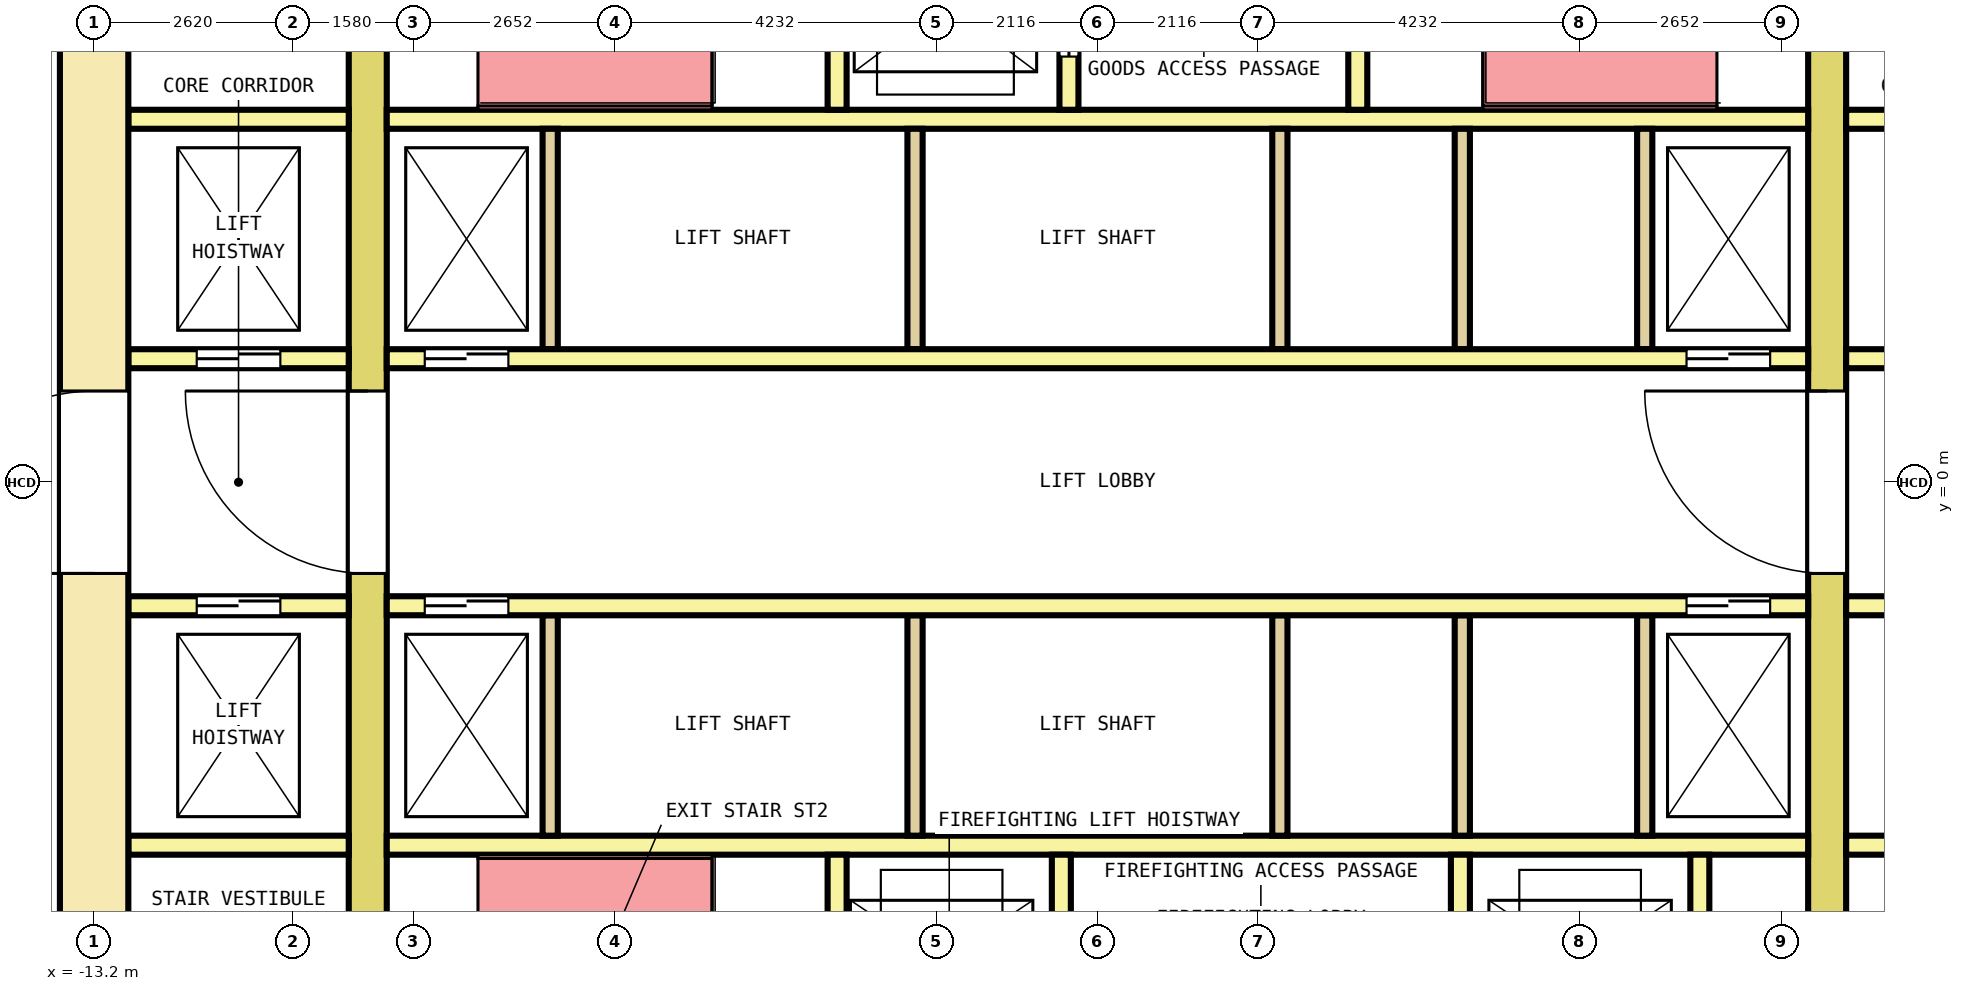
"""IFC4 building model, lengths in metres.
Left out: names, types, materials, properties, quantities, classifications, styles, units other than length and angle.
Written with IfcOpenShell. Run it as: python <this file> out.ifc"""

import sys

from ifc_helpers import new_model, si_unit, direction, frame, frame_2d, origin, place, context, subcontext, project, spatial, rectangle, extrude, element, fill, save


model = new_model("IFC4")
c1 = context("Model", 3, precision=1e-05, world=origin(), true_north=direction((0.0, 1.0)))
c2 = subcontext(c1, "Body", "Model", "MODEL_VIEW")
j1 = project(units=[si_unit("LENGTHUNIT", "METRE"), si_unit("PLANEANGLEUNIT", "RADIAN")], contexts=[c1])
p1 = place(None, origin())
s1 = spatial("IfcSite", under=j1, at=p1, CompositionType="ELEMENT")
p2 = place(p1, origin())
s2 = spatial("IfcBuilding", under=s1, at=p2, CompositionType="ELEMENT")
p3 = place(p2, frame((0.0, 0.0, 27.8)))
s3 = spatial("IfcBuildingStorey", under=s2, at=p3, CompositionType="ELEMENT", Elevation=27.8)
p4 = place(p3, frame((-13.2, -10.35, 0.0), z_axis=(0.0, 0.0, 1.0), x_axis=(0.0, 1.0, 0.0)))
e1 = element("IfcWall", 1, at=p4, inside=s3, PredefinedType="SHEAR", context=c2, shape_type="SweptSolid", body=[
    extrude(rectangle(XDim=20.7, YDim=0.9, at=frame_2d((10.35, 0.0))), origin(), (0.0, 0.0, 1.0), 4.1),
])
p5 = place(p4, frame((9.15, 0.0, 0.0)))
e2 = element("IfcOpeningElement", 2, at=p5, cuts=e1, PredefinedType="OPENING", context=c2, shape_type="SweptSolid", body=[
    extrude(rectangle(XDim=2.4, YDim=2.1, at=frame_2d((1.2, 1.05))), frame((0.0, 0.46, 0.0), z_axis=(0.0, -1.0, 0.0), x_axis=(1.0, 0.0, 0.0)), (0.0, 0.0, 1.0), 0.92),
])
p6 = place(p4, frame((16.05, 0.0, 0.0)))
e3 = element("IfcOpeningElement", 3, at=p6, cuts=e1, PredefinedType="OPENING", context=c2, shape_type="SweptSolid", body=[
    extrude(rectangle(XDim=1.2, YDim=2.1, at=frame_2d((0.6, 1.05))), frame((0.0, 0.46, 0.0), z_axis=(0.0, -1.0, 0.0), x_axis=(1.0, 0.0, 0.0)), (0.0, 0.0, 1.0), 0.92),
])
p7 = place(p4, frame((3.45, 0.0, 0.0)))
e4 = element("IfcOpeningElement", 4, at=p7, cuts=e1, PredefinedType="OPENING", context=c2, shape_type="SweptSolid", body=[
    extrude(rectangle(XDim=1.2, YDim=2.1, at=frame_2d((0.6, 1.05))), frame((0.0, 0.46, 0.0), z_axis=(0.0, -1.0, 0.0), x_axis=(1.0, 0.0, 0.0)), (0.0, 0.0, 1.0), 0.92),
])
p8 = place(p3, frame((-9.6, -7.7, 0.0), z_axis=(0.0, 0.0, 1.0), x_axis=(0.0, 1.0, 0.0)))
e5 = element("IfcWall", 5, at=p8, inside=s3, PredefinedType="SHEAR", context=c2, shape_type="SweptSolid", body=[
    extrude(rectangle(XDim=15.4, YDim=0.5, at=frame_2d((7.7, 0.0))), origin(), (0.0, 0.0, 1.0), 4.1),
])
p9 = place(p8, frame((6.5, 0.0, 0.0)))
e6 = element("IfcOpeningElement", 6, at=p9, cuts=e5, PredefinedType="OPENING", context=c2, shape_type="SweptSolid", body=[
    extrude(rectangle(XDim=2.4, YDim=2.1, at=frame_2d((1.2, 1.05))), frame((0.0, 0.26, 0.0), z_axis=(0.0, -1.0, 0.0), x_axis=(1.0, 0.0, 0.0)), (0.0, 0.0, 1.0), 0.52),
])
p10 = place(p8, frame((13.4, 0.0, 0.0)))
e7 = element("IfcOpeningElement", 7, at=p10, cuts=e5, PredefinedType="OPENING", context=c2, shape_type="SweptSolid", body=[
    extrude(rectangle(XDim=1.2, YDim=2.1, at=frame_2d((0.6, 1.05))), frame((0.0, 0.26, 0.0), z_axis=(0.0, -1.0, 0.0), x_axis=(1.0, 0.0, 0.0)), (0.0, 0.0, 1.0), 0.52),
])
p11 = place(p8, frame((0.8, 0.0, 0.0)))
e8 = element("IfcOpeningElement", 8, at=p11, cuts=e5, PredefinedType="OPENING", context=c2, shape_type="SweptSolid", body=[
    extrude(rectangle(XDim=1.2, YDim=2.1, at=frame_2d((0.6, 1.05))), frame((0.0, 0.26, 0.0), z_axis=(0.0, -1.0, 0.0), x_axis=(1.0, 0.0, 0.0)), (0.0, 0.0, 1.0), 0.52),
])
p12 = place(p3, frame((9.6, -7.7, 0.0), z_axis=(0.0, 0.0, 1.0), x_axis=(0.0, 1.0, 0.0)))
e9 = element("IfcWall", 9, at=p12, inside=s3, PredefinedType="SHEAR", context=c2, shape_type="SweptSolid", body=[
    extrude(rectangle(XDim=15.4, YDim=0.5, at=frame_2d((7.7, 0.0))), origin(), (0.0, 0.0, 1.0), 4.1),
])
p13 = place(p12, frame((6.5, 0.0, 0.0)))
e10 = element("IfcOpeningElement", 10, at=p13, cuts=e9, PredefinedType="OPENING", context=c2, shape_type="SweptSolid", body=[
    extrude(rectangle(XDim=2.4, YDim=2.1, at=frame_2d((1.2, 1.05))), frame((0.0, 0.26, 0.0), z_axis=(0.0, -1.0, 0.0), x_axis=(1.0, 0.0, 0.0)), (0.0, 0.0, 1.0), 0.52),
])
p14 = place(p12, frame((13.4, 0.0, 0.0)))
e11 = element("IfcOpeningElement", 11, at=p14, cuts=e9, PredefinedType="OPENING", context=c2, shape_type="SweptSolid", body=[
    extrude(rectangle(XDim=1.2, YDim=2.1, at=frame_2d((0.6, 1.05))), frame((0.0, 0.26, 0.0), z_axis=(0.0, -1.0, 0.0), x_axis=(1.0, 0.0, 0.0)), (0.0, 0.0, 1.0), 0.52),
])
p15 = place(p12, frame((0.9, 0.0, 0.0)))
e12 = element("IfcOpeningElement", 12, at=p15, cuts=e9, PredefinedType="OPENING", context=c2, shape_type="SweptSolid", body=[
    extrude(rectangle(XDim=1.0, YDim=2.1, at=frame_2d((0.5, 1.05))), frame((0.0, 0.26, 0.0), z_axis=(0.0, -1.0, 0.0), x_axis=(1.0, 0.0, 0.0)), (0.0, 0.0, 1.0), 0.52),
])
p16 = place(p3, frame((-12.75, 1.625, 0.0), z_axis=(0.0, 0.0, 1.0), x_axis=(1.0, 0.0, 0.0)))
e13 = element("IfcWall", 13, at=p16, inside=s3, PredefinedType="SOLIDWALL", context=c2, shape_type="SweptSolid", body=[
    extrude(rectangle(XDim=2.9, YDim=0.25, at=frame_2d((1.45, 0.0))), origin(), (0.0, 0.0, 1.0), 4.1),
])
p17 = place(p16, frame((0.9, 0.0, 0.0)))
e14 = element("IfcOpeningElement", 14, at=p17, cuts=e13, PredefinedType="OPENING", context=c2, shape_type="SweptSolid", body=[
    extrude(rectangle(XDim=1.1, YDim=2.1, at=frame_2d((0.55, 1.05))), frame((0.0, 0.135, 0.0), z_axis=(0.0, -1.0, 0.0), x_axis=(1.0, 0.0, 0.0)), (0.0, 0.0, 1.0), 0.27),
])
p18 = place(p3, frame((-9.35, 1.625, 0.0), z_axis=(0.0, 0.0, 1.0), x_axis=(1.0, 0.0, 0.0)))
e15 = element("IfcWall", 15, at=p18, inside=s3, PredefinedType="SOLIDWALL", context=c2, shape_type="SweptSolid", body=[
    extrude(rectangle(XDim=18.7, YDim=0.25, at=frame_2d((9.35, 0.0))), origin(), (0.0, 0.0, 1.0), 4.1),
])
p19 = place(p18, frame((0.5, 0.0, 0.0)))
e16 = element("IfcOpeningElement", 16, at=p19, cuts=e15, PredefinedType="OPENING", context=c2, shape_type="SweptSolid", body=[
    extrude(rectangle(XDim=1.1, YDim=2.1, at=frame_2d((0.55, 1.05))), frame((0.0, 0.135, 0.0), z_axis=(0.0, -1.0, 0.0), x_axis=(1.0, 0.0, 0.0)), (0.0, 0.0, 1.0), 0.27),
])
p20 = place(p18, frame((17.1, 0.0, 0.0)))
e17 = element("IfcOpeningElement", 17, at=p20, cuts=e15, PredefinedType="OPENING", context=c2, shape_type="SweptSolid", body=[
    extrude(rectangle(XDim=1.1, YDim=2.1, at=frame_2d((0.55, 1.05))), frame((0.0, 0.135, 0.0), z_axis=(0.0, -1.0, 0.0), x_axis=(1.0, 0.0, 0.0)), (0.0, 0.0, 1.0), 0.27),
])
p21 = place(p3, frame((9.85, 1.625, 0.0), z_axis=(0.0, 0.0, 1.0), x_axis=(1.0, 0.0, 0.0)))
e18 = element("IfcWall", 18, at=p21, inside=s3, PredefinedType="SOLIDWALL", context=c2, shape_type="SweptSolid", body=[
    extrude(rectangle(XDim=2.9, YDim=0.25, at=frame_2d((1.45, 0.0))), origin(), (0.0, 0.0, 1.0), 4.1),
])
p22 = place(p21, frame((0.9, 0.0, 0.0)))
e19 = element("IfcOpeningElement", 19, at=p22, cuts=e18, PredefinedType="OPENING", context=c2, shape_type="SweptSolid", body=[
    extrude(rectangle(XDim=1.1, YDim=2.1, at=frame_2d((0.55, 1.05))), frame((0.0, 0.135, 0.0), z_axis=(0.0, -1.0, 0.0), x_axis=(1.0, 0.0, 0.0)), (0.0, 0.0, 1.0), 0.27),
])
p23 = place(p3, frame((-12.75, 4.775, 0.0), z_axis=(0.0, 0.0, 1.0), x_axis=(1.0, 0.0, 0.0)))
e20 = element("IfcWall", 20, at=p23, inside=s3, PredefinedType="SOLIDWALL", context=c2, shape_type="SweptSolid", body=[
    extrude(rectangle(XDim=2.9, YDim=0.25, at=frame_2d((1.45, 0.0))), origin(), (0.0, 0.0, 1.0), 4.1),
])
p24 = place(p3, frame((-9.35, 4.775, 0.0), z_axis=(0.0, 0.0, 1.0), x_axis=(1.0, 0.0, 0.0)))
e21 = element("IfcWall", 21, at=p24, inside=s3, PredefinedType="SOLIDWALL", context=c2, shape_type="SweptSolid", body=[
    extrude(rectangle(XDim=18.7, YDim=0.25, at=frame_2d((9.35, 0.0))), origin(), (0.0, 0.0, 1.0), 4.1),
])
p25 = place(p3, frame((9.85, 4.775, 0.0), z_axis=(0.0, 0.0, 1.0), x_axis=(1.0, 0.0, 0.0)))
e22 = element("IfcWall", 22, at=p25, inside=s3, PredefinedType="SOLIDWALL", context=c2, shape_type="SweptSolid", body=[
    extrude(rectangle(XDim=2.9, YDim=0.25, at=frame_2d((1.45, 0.0))), origin(), (0.0, 0.0, 1.0), 4.1),
])
for number, where, z_axis, x_axis in (
    (23, (-7.2, 1.75, 0.0), (0.0, 0.0, 1.0), (0.0, 1.0, 0.0)),
    (24, (-2.4, 1.75, 0.0), (0.0, 0.0, 1.0), (0.0, 1.0, 0.0)),
    (25, (2.4, 1.75, 0.0), (0.0, 0.0, 1.0), (0.0, 1.0, 0.0)),
    (26, (4.8, 1.75, 0.0), (0.0, 0.0, 1.0), (0.0, 1.0, 0.0)),
    (27, (7.2, 1.75, 0.0), (0.0, 0.0, 1.0), (0.0, 1.0, 0.0)),
):
    element("IfcWall", number, at=place(p3, frame(where, z_axis=z_axis, x_axis=x_axis)), inside=s3, PredefinedType="SOLIDWALL", context=c2, shape_type="SweptSolid", body=[
        extrude(rectangle(XDim=2.9, YDim=0.2, at=frame_2d((1.45, 0.0))), origin(), (0.0, 0.0, 1.0), 4.1),
    ])
p26 = place(p3, frame((-12.75, -1.625, 0.0), z_axis=(0.0, 0.0, 1.0), x_axis=(1.0, 0.0, 0.0)))
e28 = element("IfcWall", 28, at=p26, inside=s3, PredefinedType="SOLIDWALL", context=c2, shape_type="SweptSolid", body=[
    extrude(rectangle(XDim=2.9, YDim=0.25, at=frame_2d((1.45, 0.0))), origin(), (0.0, 0.0, 1.0), 4.1),
])
p27 = place(p26, frame((0.9, 0.0, 0.0)))
e29 = element("IfcOpeningElement", 29, at=p27, cuts=e28, PredefinedType="OPENING", context=c2, shape_type="SweptSolid", body=[
    extrude(rectangle(XDim=1.1, YDim=2.1, at=frame_2d((0.55, 1.05))), frame((0.0, 0.135, 0.0), z_axis=(0.0, -1.0, 0.0), x_axis=(1.0, 0.0, 0.0)), (0.0, 0.0, 1.0), 0.27),
])
p28 = place(p3, frame((-9.35, -1.625, 0.0), z_axis=(0.0, 0.0, 1.0), x_axis=(1.0, 0.0, 0.0)))
e30 = element("IfcWall", 30, at=p28, inside=s3, PredefinedType="SOLIDWALL", context=c2, shape_type="SweptSolid", body=[
    extrude(rectangle(XDim=18.7, YDim=0.25, at=frame_2d((9.35, 0.0))), origin(), (0.0, 0.0, 1.0), 4.1),
])
p29 = place(p28, frame((0.5, 0.0, 0.0)))
e31 = element("IfcOpeningElement", 31, at=p29, cuts=e30, PredefinedType="OPENING", context=c2, shape_type="SweptSolid", body=[
    extrude(rectangle(XDim=1.1, YDim=2.1, at=frame_2d((0.55, 1.05))), frame((0.0, 0.135, 0.0), z_axis=(0.0, -1.0, 0.0), x_axis=(1.0, 0.0, 0.0)), (0.0, 0.0, 1.0), 0.27),
])
p30 = place(p28, frame((17.1, 0.0, 0.0)))
e32 = element("IfcOpeningElement", 32, at=p30, cuts=e30, PredefinedType="OPENING", context=c2, shape_type="SweptSolid", body=[
    extrude(rectangle(XDim=1.1, YDim=2.1, at=frame_2d((0.55, 1.05))), frame((0.0, 0.135, 0.0), z_axis=(0.0, -1.0, 0.0), x_axis=(1.0, 0.0, 0.0)), (0.0, 0.0, 1.0), 0.27),
])
p31 = place(p3, frame((9.85, -1.625, 0.0), z_axis=(0.0, 0.0, 1.0), x_axis=(1.0, 0.0, 0.0)))
e33 = element("IfcWall", 33, at=p31, inside=s3, PredefinedType="SOLIDWALL", context=c2, shape_type="SweptSolid", body=[
    extrude(rectangle(XDim=2.9, YDim=0.25, at=frame_2d((1.45, 0.0))), origin(), (0.0, 0.0, 1.0), 4.1),
])
p32 = place(p31, frame((0.9, 0.0, 0.0)))
e34 = element("IfcOpeningElement", 34, at=p32, cuts=e33, PredefinedType="OPENING", context=c2, shape_type="SweptSolid", body=[
    extrude(rectangle(XDim=1.1, YDim=2.1, at=frame_2d((0.55, 1.05))), frame((0.0, 0.135, 0.0), z_axis=(0.0, -1.0, 0.0), x_axis=(1.0, 0.0, 0.0)), (0.0, 0.0, 1.0), 0.27),
])
p33 = place(p3, frame((-12.75, -4.775, 0.0), z_axis=(0.0, 0.0, 1.0), x_axis=(1.0, 0.0, 0.0)))
e35 = element("IfcWall", 35, at=p33, inside=s3, PredefinedType="SOLIDWALL", context=c2, shape_type="SweptSolid", body=[
    extrude(rectangle(XDim=2.9, YDim=0.25, at=frame_2d((1.45, 0.0))), origin(), (0.0, 0.0, 1.0), 4.1),
])
p34 = place(p3, frame((-9.35, -4.775, 0.0), z_axis=(0.0, 0.0, 1.0), x_axis=(1.0, 0.0, 0.0)))
e36 = element("IfcWall", 36, at=p34, inside=s3, PredefinedType="SOLIDWALL", context=c2, shape_type="SweptSolid", body=[
    extrude(rectangle(XDim=18.7, YDim=0.25, at=frame_2d((9.35, 0.0))), origin(), (0.0, 0.0, 1.0), 4.1),
])
p35 = place(p3, frame((9.85, -4.775, 0.0), z_axis=(0.0, 0.0, 1.0), x_axis=(1.0, 0.0, 0.0)))
e37 = element("IfcWall", 37, at=p35, inside=s3, PredefinedType="SOLIDWALL", context=c2, shape_type="SweptSolid", body=[
    extrude(rectangle(XDim=2.9, YDim=0.25, at=frame_2d((1.45, 0.0))), origin(), (0.0, 0.0, 1.0), 4.1),
])
for number, where, z_axis, x_axis in (
    (38, (-7.2, -4.65, 0.0), (0.0, 0.0, 1.0), (0.0, 1.0, 0.0)),
    (39, (-2.4, -4.65, 0.0), (0.0, 0.0, 1.0), (0.0, 1.0, 0.0)),
    (40, (2.4, -4.65, 0.0), (0.0, 0.0, 1.0), (0.0, 1.0, 0.0)),
    (41, (4.8, -4.65, 0.0), (0.0, 0.0, 1.0), (0.0, 1.0, 0.0)),
    (42, (7.2, -4.65, 0.0), (0.0, 0.0, 1.0), (0.0, 1.0, 0.0)),
):
    element("IfcWall", number, at=place(p3, frame(where, z_axis=z_axis, x_axis=x_axis)), inside=s3, PredefinedType="SOLIDWALL", context=c2, shape_type="SweptSolid", body=[
        extrude(rectangle(XDim=2.9, YDim=0.2, at=frame_2d((1.45, 0.0))), origin(), (0.0, 0.0, 1.0), 4.1),
    ])
p36 = place(p3, frame((-3.425, 4.9, 0.0), z_axis=(0.0, 0.0, 1.0), x_axis=(0.0, 1.0, 0.0)))
e43 = element("IfcWall", 43, at=p36, inside=s3, PredefinedType="SOLIDWALL", context=c2, shape_type="SweptSolid", body=[
    extrude(rectangle(XDim=2.8, YDim=0.25, at=frame_2d((1.4, 0.0))), origin(), (0.0, 0.0, 1.0), 4.1),
])
p37 = place(p3, frame((-0.375, 4.9, 0.0), z_axis=(0.0, 0.0, 1.0), x_axis=(0.0, 1.0, 0.0)))
e44 = element("IfcWall", 44, at=p37, inside=s3, PredefinedType="SOLIDWALL", context=c2, shape_type="SweptSolid", body=[
    extrude(rectangle(XDim=2.8, YDim=0.25, at=frame_2d((1.4, 0.0))), origin(), (0.0, 0.0, 1.0), 4.1),
])
p38 = place(p37, frame((0.7, 0.0, 0.0)))
e45 = element("IfcOpeningElement", 45, at=p38, cuts=e44, PredefinedType="OPENING", context=c2, shape_type="SweptSolid", body=[
    extrude(rectangle(XDim=1.4, YDim=2.1, at=frame_2d((0.7, 1.05))), frame((0.0, 0.135, 0.0), z_axis=(0.0, -1.0, 0.0), x_axis=(1.0, 0.0, 0.0)), (0.0, 0.0, 1.0), 0.27),
])
for number, where, z_axis, x_axis in (
    (46, (3.425, 4.9, 0.0), (0.0, 0.0, 1.0), (0.0, 1.0, 0.0)),
    (47, (-3.425, -7.7, 0.0), (0.0, 0.0, 1.0), (0.0, 1.0, 0.0)),
):
    element("IfcWall", number, at=place(p3, frame(where, z_axis=z_axis, x_axis=x_axis)), inside=s3, PredefinedType="SOLIDWALL", context=c2, shape_type="SweptSolid", body=[
        extrude(rectangle(XDim=2.8, YDim=0.25, at=frame_2d((1.4, 0.0))), origin(), (0.0, 0.0, 1.0), 4.1),
    ])
p39 = place(p3, frame((-0.475, -7.7, 0.0), z_axis=(0.0, 0.0, 1.0), x_axis=(0.0, 1.0, 0.0)))
e48 = element("IfcWall", 48, at=p39, inside=s3, PredefinedType="SOLIDWALL", context=c2, shape_type="SweptSolid", body=[
    extrude(rectangle(XDim=2.8, YDim=0.25, at=frame_2d((1.4, 0.0))), origin(), (0.0, 0.0, 1.0), 4.1),
])
p40 = place(p39, frame((0.85, 0.0, 0.0)))
e49 = element("IfcOpeningElement", 49, at=p40, cuts=e48, PredefinedType="OPENING", context=c2, shape_type="SweptSolid", body=[
    extrude(rectangle(XDim=1.1, YDim=2.1, at=frame_2d((0.55, 1.05))), frame((0.0, 0.135, 0.0), z_axis=(0.0, -1.0, 0.0), x_axis=(1.0, 0.0, 0.0)), (0.0, 0.0, 1.0), 0.27),
])
p41 = place(p3, frame((4.775, -7.7, 0.0), z_axis=(0.0, 0.0, 1.0), x_axis=(0.0, 1.0, 0.0)))
e50 = element("IfcWall", 50, at=p41, inside=s3, PredefinedType="SOLIDWALL", context=c2, shape_type="SweptSolid", body=[
    extrude(rectangle(XDim=2.8, YDim=0.25, at=frame_2d((1.4, 0.0))), origin(), (0.0, 0.0, 1.0), 4.1),
])
p42 = place(p41, frame((0.85, 0.0, 0.0)))
e51 = element("IfcOpeningElement", 51, at=p42, cuts=e50, PredefinedType="OPENING", context=c2, shape_type="SweptSolid", body=[
    extrude(rectangle(XDim=1.1, YDim=2.1, at=frame_2d((0.55, 1.05))), frame((0.0, 0.135, 0.0), z_axis=(0.0, -1.0, 0.0), x_axis=(1.0, 0.0, 0.0)), (0.0, 0.0, 1.0), 0.27),
])
p43 = place(p3, frame((7.925, -7.7, 0.0), z_axis=(0.0, 0.0, 1.0), x_axis=(0.0, 1.0, 0.0)))
e52 = element("IfcWall", 52, at=p43, inside=s3, PredefinedType="SOLIDWALL", context=c2, shape_type="SweptSolid", body=[
    extrude(rectangle(XDim=2.8, YDim=0.25, at=frame_2d((1.4, 0.0))), origin(), (0.0, 0.0, 1.0), 4.1),
])
p44 = place(p17, origin())
e53 = element("IfcDoor", 53, at=p44, inside=s3, OperationType="DOUBLE_DOOR_SLIDING", PredefinedType="DOOR", context=c2, shape_type="SweptSolid", body=[
    extrude(rectangle(XDim=1.1, YDim=2.1, at=frame_2d((0.55, 1.05))), frame((0.0, 0.075, 0.0), z_axis=(0.0, -1.0, 0.0), x_axis=(1.0, 0.0, 0.0)), (0.0, 0.0, 1.0), 0.15),
])
fill(e14, e53)
p45 = place(p19, origin())
e54 = element("IfcDoor", 54, at=p45, inside=s3, OperationType="DOUBLE_DOOR_SLIDING", PredefinedType="DOOR", context=c2, shape_type="SweptSolid", body=[
    extrude(rectangle(XDim=1.1, YDim=2.1, at=frame_2d((0.55, 1.05))), frame((0.0, 0.075, 0.0), z_axis=(0.0, -1.0, 0.0), x_axis=(1.0, 0.0, 0.0)), (0.0, 0.0, 1.0), 0.15),
])
fill(e16, e54)
p46 = place(p20, origin())
e55 = element("IfcDoor", 55, at=p46, inside=s3, OperationType="DOUBLE_DOOR_SLIDING", PredefinedType="DOOR", context=c2, shape_type="SweptSolid", body=[
    extrude(rectangle(XDim=1.1, YDim=2.1, at=frame_2d((0.55, 1.05))), frame((0.0, 0.075, 0.0), z_axis=(0.0, -1.0, 0.0), x_axis=(1.0, 0.0, 0.0)), (0.0, 0.0, 1.0), 0.15),
])
fill(e17, e55)
p47 = place(p27, origin())
e56 = element("IfcDoor", 56, at=p47, inside=s3, OperationType="DOUBLE_DOOR_SLIDING", PredefinedType="DOOR", context=c2, shape_type="SweptSolid", body=[
    extrude(rectangle(XDim=1.1, YDim=2.1, at=frame_2d((0.55, 1.05))), frame((0.0, 0.075, 0.0), z_axis=(0.0, -1.0, 0.0), x_axis=(1.0, 0.0, 0.0)), (0.0, 0.0, 1.0), 0.15),
])
fill(e29, e56)
p48 = place(p29, origin())
e57 = element("IfcDoor", 57, at=p48, inside=s3, OperationType="DOUBLE_DOOR_SLIDING", PredefinedType="DOOR", context=c2, shape_type="SweptSolid", body=[
    extrude(rectangle(XDim=1.1, YDim=2.1, at=frame_2d((0.55, 1.05))), frame((0.0, 0.075, 0.0), z_axis=(0.0, -1.0, 0.0), x_axis=(1.0, 0.0, 0.0)), (0.0, 0.0, 1.0), 0.15),
])
fill(e31, e57)
p49 = place(p30, origin())
e58 = element("IfcDoor", 58, at=p49, inside=s3, OperationType="DOUBLE_DOOR_SLIDING", PredefinedType="DOOR", context=c2, shape_type="SweptSolid", body=[
    extrude(rectangle(XDim=1.1, YDim=2.1, at=frame_2d((0.55, 1.05))), frame((0.0, 0.075, 0.0), z_axis=(0.0, -1.0, 0.0), x_axis=(1.0, 0.0, 0.0)), (0.0, 0.0, 1.0), 0.15),
])
fill(e32, e58)
p50 = place(p38, origin())
e59 = element("IfcDoor", 59, at=p50, inside=s3, OperationType="DOUBLE_DOOR_SLIDING", PredefinedType="DOOR", context=c2, shape_type="SweptSolid", body=[
    extrude(rectangle(XDim=1.4, YDim=2.1, at=frame_2d((0.7, 1.05))), frame((0.0, 0.075, 0.0), z_axis=(0.0, -1.0, 0.0), x_axis=(1.0, 0.0, 0.0)), (0.0, 0.0, 1.0), 0.15),
])
fill(e45, e59)
p51 = place(p9, origin())
e60 = element("IfcDoor", 60, at=p51, inside=s3, OperationType="DOUBLE_DOOR_SINGLE_SWING", PredefinedType="DOOR", context=c2, shape_type="SweptSolid", body=[
    extrude(rectangle(XDim=2.4, YDim=2.1, at=frame_2d((1.2, 1.05))), frame((0.0, 0.2, 0.0), z_axis=(0.0, -1.0, 0.0), x_axis=(1.0, 0.0, 0.0)), (0.0, 0.0, 1.0), 0.4),
])
fill(e6, e60)
p52 = place(p13, origin())
e61 = element("IfcDoor", 61, at=p52, inside=s3, OperationType="DOUBLE_DOOR_SINGLE_SWING", PredefinedType="DOOR", context=c2, shape_type="SweptSolid", body=[
    extrude(rectangle(XDim=2.4, YDim=2.1, at=frame_2d((1.2, 1.05))), frame((0.0, 0.2, 0.0), z_axis=(0.0, -1.0, 0.0), x_axis=(1.0, 0.0, 0.0)), (0.0, 0.0, 1.0), 0.4),
])
fill(e10, e61)
p53 = place(p5, origin())
e62 = element("IfcDoor", 62, at=p53, inside=s3, OperationType="DOUBLE_DOOR_SINGLE_SWING", PredefinedType="DOOR", context=c2, shape_type="SweptSolid", body=[
    extrude(rectangle(XDim=2.4, YDim=2.1, at=frame_2d((1.2, 1.05))), frame((0.0, 0.3, 0.0), z_axis=(0.0, -1.0, 0.0), x_axis=(1.0, 0.0, 0.0)), (0.0, 0.0, 1.0), 0.6),
])
fill(e2, e62)
save(model, sys.argv[1])
